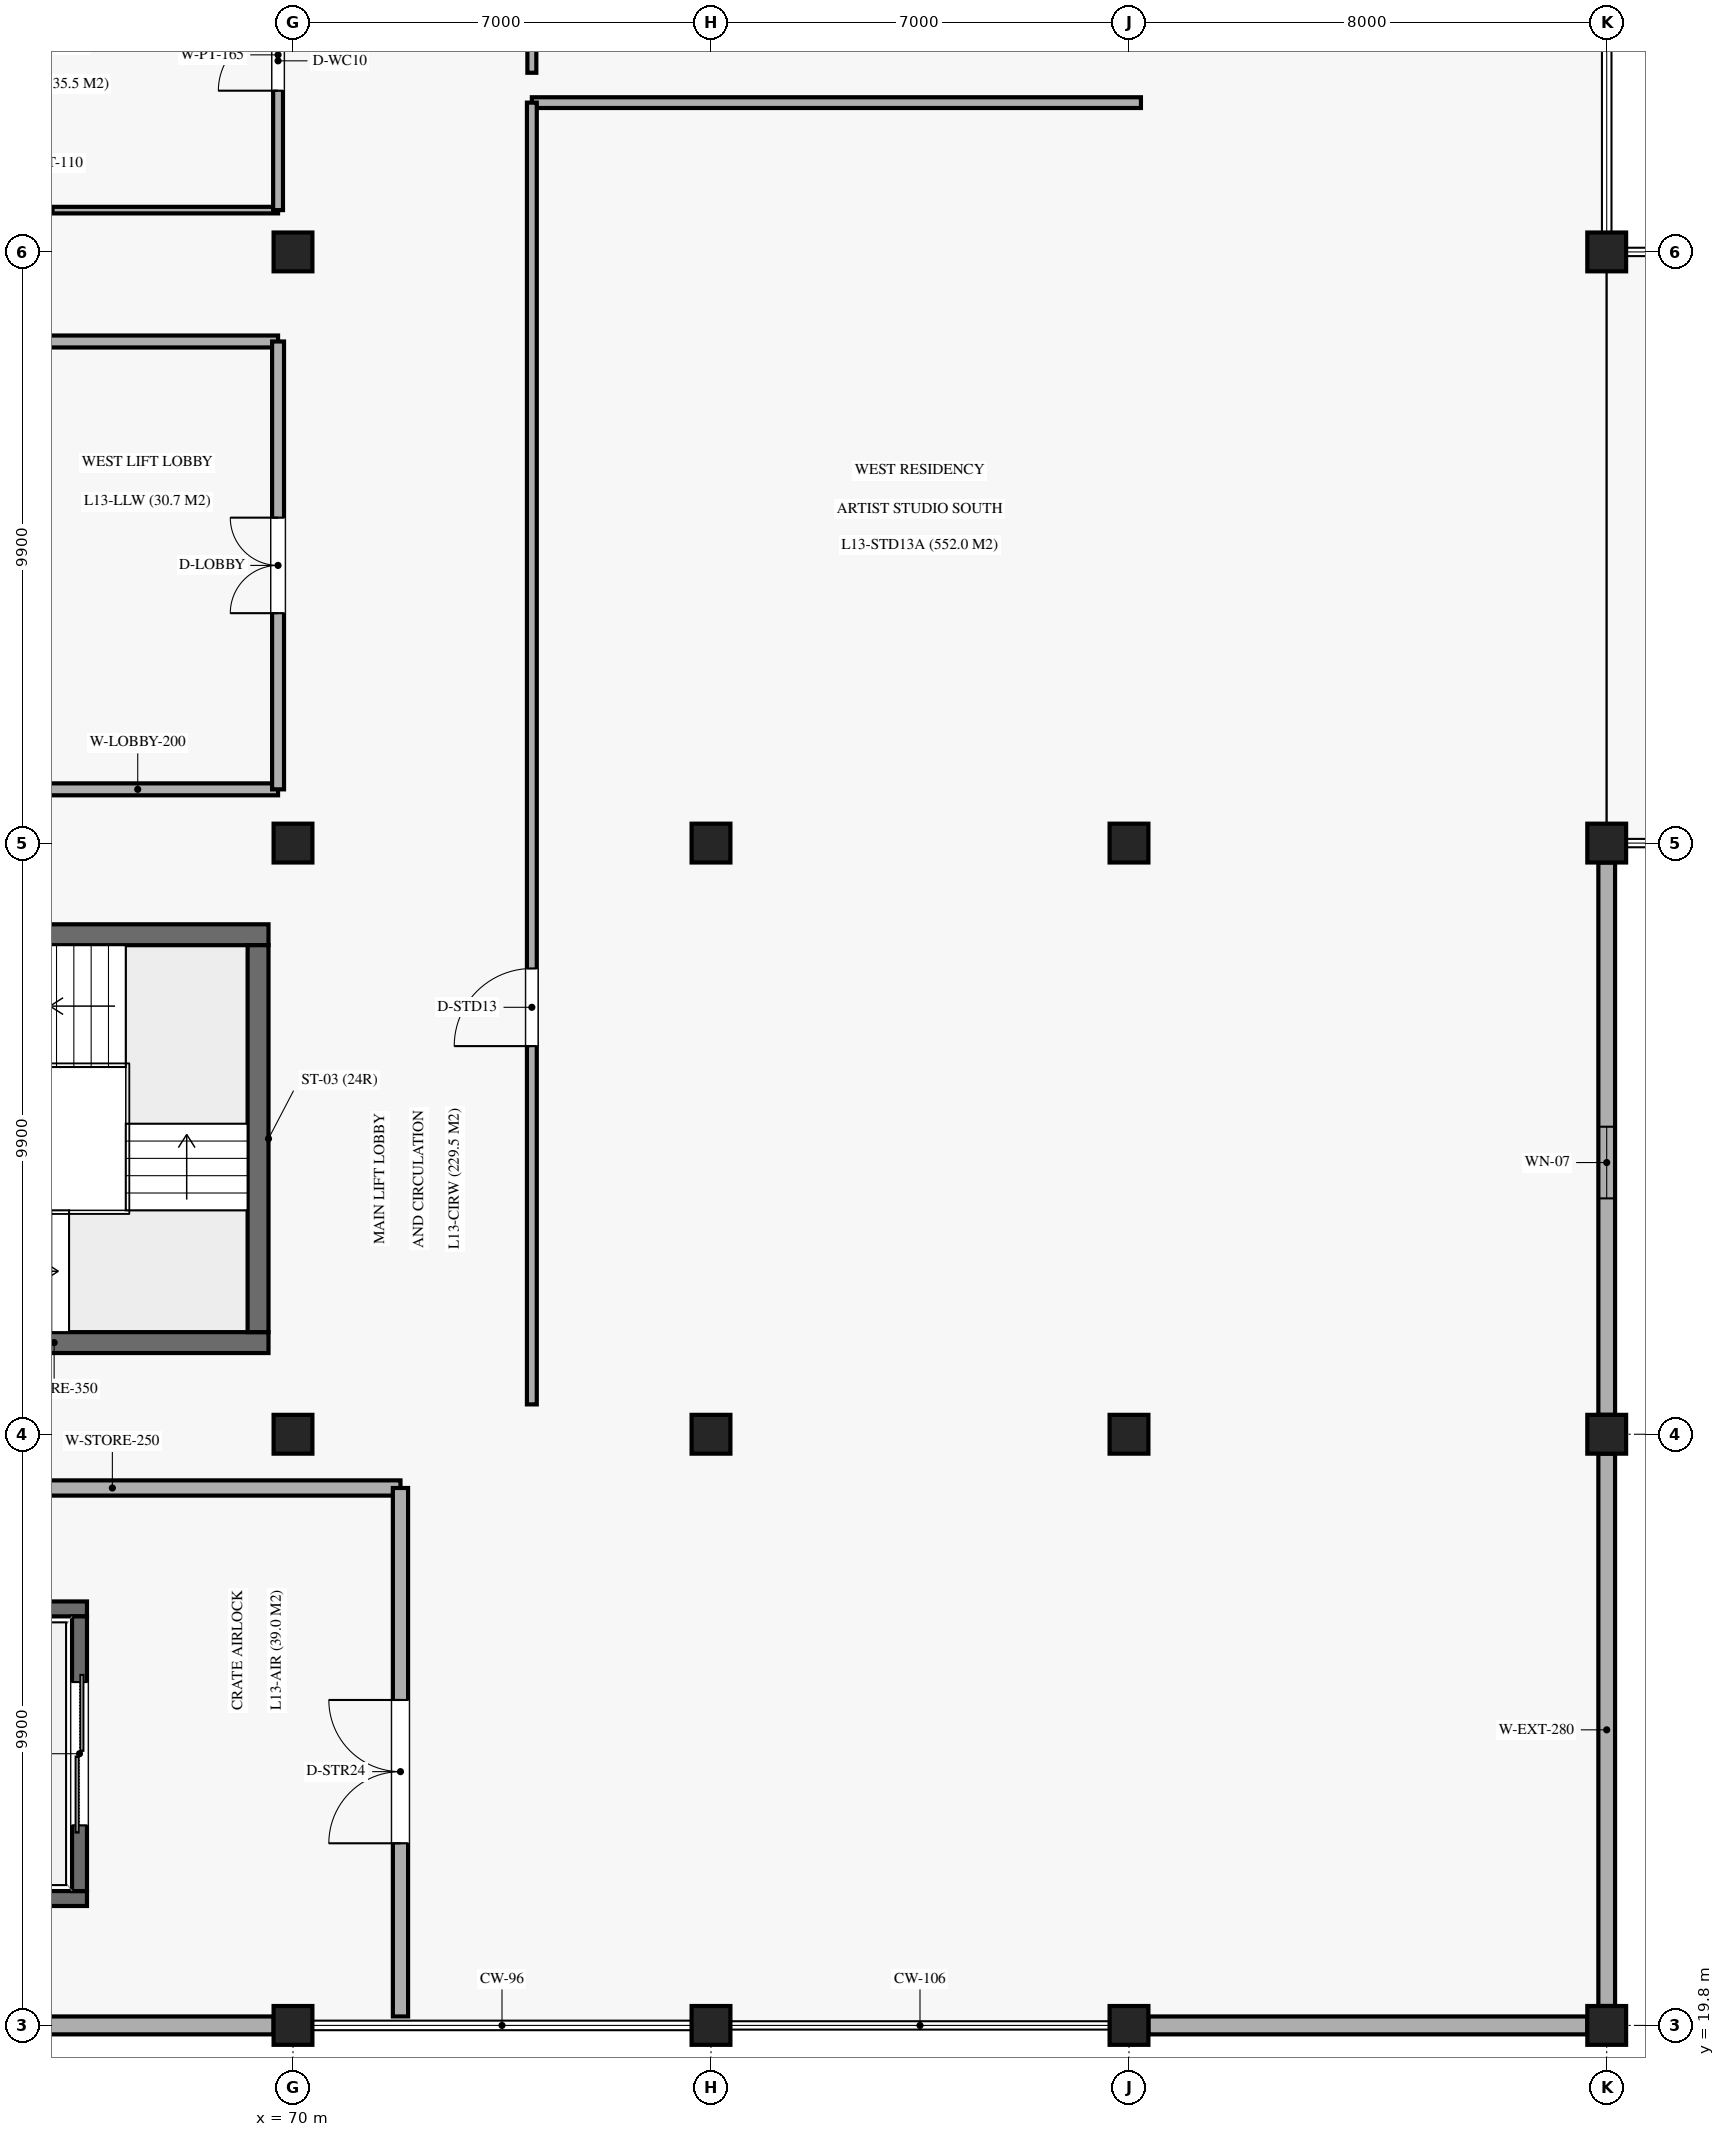
"""IFC4 building model, lengths in metres.
Left out: names, types, materials, properties, quantities, classifications, styles, units other than length and angle.
Written with IfcOpenShell. Run it as: python <this file> out.ifc"""

import sys

from ifc_helpers import new_model, si_unit, direction, frame, frame_2d, origin, origin_2d, place, context, subcontext, project, spatial, rectangle, extrude, element, fill, save


model = new_model("IFC4")
c1 = context("Model", 3, precision=1e-05, world=origin(), true_north=direction((0.0, 1.0)))
c2 = subcontext(c1, "Body", "Model", "MODEL_VIEW")
j1 = project(units=[si_unit("LENGTHUNIT", "METRE"), si_unit("PLANEANGLEUNIT", "RADIAN")], contexts=[c1])
p1 = place(None, origin())
s1 = spatial("IfcSite", under=j1, at=p1, CompositionType="ELEMENT")
p2 = place(p1, origin())
s2 = spatial("IfcBuilding", under=s1, at=p2, CompositionType="ELEMENT")
p3 = place(p2, frame((0.0, 0.0, 66.3)))
s3 = spatial("IfcBuildingStorey", under=s2, at=p3, CompositionType="ELEMENT", Elevation=66.3)
for number, where, z_axis, x_axis in (
    (1, (70.0, 19.8, 0.0), (0.0, 0.0, 1.0), (1.0, 0.0, 0.0)),
    (2, (70.0, 29.7, 0.0), (0.0, 0.0, 1.0), (1.0, 0.0, 0.0)),
    (3, (70.0, 39.6, 0.0), (0.0, 0.0, 1.0), (1.0, 0.0, 0.0)),
    (4, (70.0, 49.5, 0.0), (0.0, 0.0, 1.0), (1.0, 0.0, 0.0)),
    (5, (77.0, 19.8, 0.0), (0.0, 0.0, 1.0), (1.0, 0.0, 0.0)),
    (6, (77.0, 29.7, 0.0), (0.0, 0.0, 1.0), (1.0, 0.0, 0.0)),
    (7, (77.0, 39.6, 0.0), (0.0, 0.0, 1.0), (1.0, 0.0, 0.0)),
    (8, (84.0, 19.8, 0.0), (0.0, 0.0, 1.0), (1.0, 0.0, 0.0)),
    (9, (84.0, 29.7, 0.0), (0.0, 0.0, 1.0), (1.0, 0.0, 0.0)),
    (10, (84.0, 39.6, 0.0), (0.0, 0.0, 1.0), (1.0, 0.0, 0.0)),
    (11, (92.0, 19.8, 0.0), (0.0, 0.0, 1.0), (1.0, 0.0, 0.0)),
    (12, (92.0, 29.7, 0.0), (0.0, 0.0, 1.0), (1.0, 0.0, 0.0)),
    (13, (92.0, 39.6, 0.0), (0.0, 0.0, 1.0), (1.0, 0.0, 0.0)),
    (14, (92.0, 49.5, 0.0), (0.0, 0.0, 1.0), (1.0, 0.0, 0.0)),
):
    element("IfcColumn", number, at=place(p3, frame(where, z_axis=z_axis, x_axis=x_axis)), inside=s3, PredefinedType="COLUMN", context=c2, shape_type="SweptSolid", body=[
        extrude(rectangle(XDim=0.65, YDim=0.65, at=origin_2d()), origin(), (0.0, 0.0, 1.0), 4.08),
    ])
p4 = place(p3, frame((92.0, 20.125, 0.0), z_axis=(0.0, 0.0, 1.0), x_axis=(0.0, 1.0, 0.0)))
e15 = element("IfcWall", 15, at=p4, inside=s3, PredefinedType="SOLIDWALL", context=c2, shape_type="SweptSolid", body=[
    extrude(rectangle(XDim=9.25, YDim=0.28, at=frame_2d((4.625, 0.0))), origin(), (0.0, 0.0, 1.0), 3.08),
])
p5 = place(p3, frame((92.0, 30.025, 0.0), z_axis=(0.0, 0.0, 1.0), x_axis=(0.0, 1.0, 0.0)))
e16 = element("IfcWall", 16, at=p5, inside=s3, PredefinedType="SOLIDWALL", context=c2, shape_type="SweptSolid", body=[
    extrude(rectangle(XDim=9.25, YDim=0.28, at=frame_2d((4.625, 0.0))), origin(), (0.0, 0.0, 1.0), 3.08),
])
p6 = place(p5, frame((3.625, 0.0, 1.15)))
e17 = element("IfcOpeningElement", 17, at=p6, cuts=e16, PredefinedType="OPENING", context=c2, shape_type="SweptSolid", body=[
    extrude(rectangle(XDim=1.2, YDim=1.5, at=frame_2d((0.6, 0.75))), frame((0.0, 0.15, 0.0), z_axis=(0.0, -1.0, 0.0), x_axis=(1.0, 0.0, 0.0)), (0.0, 0.0, 1.0), 0.3),
])
for number, where, z_axis, x_axis in (
    (18, (62.325, 19.8, 0.0), (0.0, 0.0, 1.0), (1.0, 0.0, 0.0)),
    (19, (84.325, 19.8, 0.0), (0.0, 0.0, 1.0), (1.0, 0.0, 0.0)),
):
    element("IfcWall", number, at=place(p3, frame(where, z_axis=z_axis, x_axis=x_axis)), inside=s3, PredefinedType="SOLIDWALL", context=c2, shape_type="SweptSolid", body=[
        extrude(rectangle(XDim=7.35, YDim=0.3, at=frame_2d((3.675, 0.0))), origin(), (0.0, 0.0, 1.0), 3.08),
    ])
p7 = place(p3, frame((62.41, 31.235, 0.0), z_axis=(0.0, 0.0, 1.0), x_axis=(1.0, 0.0, 0.0)))
e20 = element("IfcWall", 20, at=p7, inside=s3, PredefinedType="SHEAR", context=c2, shape_type="SweptSolid", body=[
    extrude(rectangle(XDim=7.18, YDim=0.35, at=frame_2d((3.59, 0.0))), origin(), (0.0, 0.0, 1.0), 3.83),
])
p8 = place(p7, frame((0.77, 0.0, 0.0)))
e21 = element("IfcOpeningElement", 21, at=p8, cuts=e20, PredefinedType="OPENING", context=c2, shape_type="SweptSolid", body=[
    extrude(rectangle(XDim=1.2, YDim=2.2, at=frame_2d((0.6, 1.1))), frame((0.0, 0.185, 0.0), z_axis=(0.0, -1.0, 0.0), x_axis=(1.0, 0.0, 0.0)), (0.0, 0.0, 1.0), 0.37),
])
p9 = place(p3, frame((62.41, 38.065, 0.0), z_axis=(0.0, 0.0, 1.0), x_axis=(1.0, 0.0, 0.0)))
e22 = element("IfcWall", 22, at=p9, inside=s3, PredefinedType="SHEAR", context=c2, shape_type="SweptSolid", body=[
    extrude(rectangle(XDim=7.18, YDim=0.35, at=frame_2d((3.59, 0.0))), origin(), (0.0, 0.0, 1.0), 3.83),
])
p10 = place(p3, frame((69.415, 31.41, 0.0), z_axis=(0.0, 0.0, 1.0), x_axis=(0.0, 1.0, 0.0)))
e23 = element("IfcWall", 23, at=p10, inside=s3, PredefinedType="SHEAR", context=c2, shape_type="SweptSolid", body=[
    extrude(rectangle(XDim=6.48, YDim=0.35, at=frame_2d((3.24, 0.0))), origin(), (0.0, 0.0, 1.0), 3.83),
])
for number, where, z_axis, x_axis in (
    (24, (62.65, 21.925, 0.0), (0.0, 0.0, 1.0), (1.0, 0.0, 0.0)),
    (25, (62.65, 26.775, 0.0), (0.0, 0.0, 1.0), (1.0, 0.0, 0.0)),
):
    element("IfcWall", number, at=place(p3, frame(where, z_axis=z_axis, x_axis=x_axis)), inside=s3, PredefinedType="SOLIDWALL", context=c2, shape_type="SweptSolid", body=[
        extrude(rectangle(XDim=3.9, YDim=0.25, at=frame_2d((1.95, 0.0))), origin(), (0.0, 0.0, 1.0), 3.81),
    ])
p11 = place(p3, frame((66.425, 22.05, 0.0), z_axis=(0.0, 0.0, 1.0), x_axis=(0.0, 1.0, 0.0)))
e26 = element("IfcWall", 26, at=p11, inside=s3, PredefinedType="SOLIDWALL", context=c2, shape_type="SweptSolid", body=[
    extrude(rectangle(XDim=4.6, YDim=0.25, at=frame_2d((2.3, 0.0))), origin(), (0.0, 0.0, 1.0), 3.81),
])
p12 = place(p11, frame((1.1, 0.0, 0.0)))
e27 = element("IfcOpeningElement", 27, at=p12, cuts=e26, PredefinedType="OPENING", context=c2, shape_type="SweptSolid", body=[
    extrude(rectangle(XDim=2.4, YDim=2.65, at=frame_2d((1.2, 1.325))), frame((0.0, 0.135, 0.0), z_axis=(0.0, -1.0, 0.0), x_axis=(1.0, 0.0, 0.0)), (0.0, 0.0, 1.0), 0.27),
])
for number, where, z_axis, x_axis in (
    (28, (65.05, 40.5, 0.0), (0.0, 0.0, 1.0), (1.0, 0.0, 0.0)),
    (29, (65.05, 48.0, 0.0), (0.0, 0.0, 1.0), (1.0, 0.0, 0.0)),
):
    element("IfcWall", number, at=place(p3, frame(where, z_axis=z_axis, x_axis=x_axis)), inside=s3, PredefinedType="SOLIDWALL", context=c2, shape_type="SweptSolid", body=[
        extrude(rectangle(XDim=4.7, YDim=0.2, at=frame_2d((2.35, 0.0))), origin(), (0.0, 0.0, 1.0), 2.95),
    ])
p13 = place(p3, frame((69.75, 40.5, 0.0), z_axis=(0.0, 0.0, 1.0), x_axis=(0.0, 1.0, 0.0)))
e30 = element("IfcWall", 30, at=p13, inside=s3, PredefinedType="SOLIDWALL", context=c2, shape_type="SweptSolid", body=[
    extrude(rectangle(XDim=7.5, YDim=0.2, at=frame_2d((3.75, 0.0))), origin(), (0.0, 0.0, 1.0), 2.95),
])
p14 = place(p13, frame((2.95, 0.0, 0.0)))
e31 = element("IfcOpeningElement", 31, at=p14, cuts=e30, PredefinedType="OPENING", context=c2, shape_type="SweptSolid", body=[
    extrude(rectangle(XDim=1.6, YDim=2.2, at=frame_2d((0.8, 1.1))), frame((0.0, 0.11, 0.0), z_axis=(0.0, -1.0, 0.0), x_axis=(1.0, 0.0, 0.0)), (0.0, 0.0, 1.0), 0.22),
])
p15 = place(p3, frame((62.15, 28.8, 0.0), z_axis=(0.0, 0.0, 1.0), x_axis=(1.0, 0.0, 0.0)))
e32 = element("IfcWall", 32, at=p15, inside=s3, PredefinedType="SOLIDWALL", context=c2, shape_type="SweptSolid", body=[
    extrude(rectangle(XDim=9.65, YDim=0.255, at=frame_2d((4.825, 0.0))), origin(), (0.0, 0.0, 1.0), 2.95),
])
p16 = place(p3, frame((71.8, 19.95, 0.0), z_axis=(0.0, 0.0, 1.0), x_axis=(0.0, 1.0, 0.0)))
e33 = element("IfcWall", 33, at=p16, inside=s3, PredefinedType="SOLIDWALL", context=c2, shape_type="SweptSolid", body=[
    extrude(rectangle(XDim=8.85, YDim=0.255, at=frame_2d((4.425, 0.0))), origin(), (0.0, 0.0, 1.0), 2.95),
])
p17 = place(p16, frame((2.9, 0.0, 0.0)))
e34 = element("IfcOpeningElement", 34, at=p17, cuts=e33, PredefinedType="OPENING", context=c2, shape_type="SweptSolid", body=[
    extrude(rectangle(XDim=2.4, YDim=2.5, at=frame_2d((1.2, 1.25))), frame((0.0, 0.137, 0.0), z_axis=(0.0, -1.0, 0.0), x_axis=(1.0, 0.0, 0.0)), (0.0, 0.0, 1.0), 0.275),
])
p18 = place(p3, frame((62.15, 50.2, 0.0), z_axis=(0.0, 0.0, 1.0), x_axis=(1.0, 0.0, 0.0)))
e35 = element("IfcWall", 35, at=p18, inside=s3, PredefinedType="PARTITIONING", context=c2, shape_type="SweptSolid", body=[
    extrude(rectangle(XDim=7.6, YDim=0.11, at=frame_2d((3.8, 0.0))), origin(), (0.0, 0.0, 1.0), 2.95),
])
p19 = place(p3, frame((69.75, 50.2, 0.0), z_axis=(0.0, 0.0, 1.0), x_axis=(0.0, 1.0, 0.0)))
e36 = element("IfcWall", 36, at=p19, inside=s3, PredefinedType="PARTITIONING", context=c2, shape_type="SweptSolid", body=[
    extrude(rectangle(XDim=5.2, YDim=0.165, at=frame_2d((2.6, 0.0))), origin(), (0.0, 0.0, 1.0), 2.95),
])
p20 = place(p19, frame((2.0, 0.0, 0.0)))
e37 = element("IfcOpeningElement", 37, at=p20, cuts=e36, PredefinedType="OPENING", context=c2, shape_type="SweptSolid", body=[
    extrude(rectangle(XDim=1.0, YDim=2.1, at=frame_2d((0.5, 1.05))), frame((0.0, 0.093, 0.0), z_axis=(0.0, -1.0, 0.0), x_axis=(1.0, 0.0, 0.0)), (0.0, 0.0, 1.0), 0.185),
])
p21 = place(p3, frame((74.0, 52.0, 0.0), z_axis=(0.0, 0.0, 1.0), x_axis=(1.0, 0.0, 0.0)))
e38 = element("IfcWall", 38, at=p21, inside=s3, PredefinedType="PARTITIONING", context=c2, shape_type="SweptSolid", body=[
    extrude(rectangle(XDim=10.2, YDim=0.18, at=frame_2d((5.1, 0.0))), origin(), (0.0, 0.0, 1.0), 2.95),
])
p22 = place(p3, frame((74.0, 30.2, 0.0), z_axis=(0.0, 0.0, 1.0), x_axis=(0.0, 1.0, 0.0)))
e39 = element("IfcWall", 39, at=p22, inside=s3, PredefinedType="PARTITIONING", context=c2, shape_type="SweptSolid", body=[
    extrude(rectangle(XDim=21.8, YDim=0.165, at=frame_2d((10.9, 0.0))), origin(), (0.0, 0.0, 1.0), 2.95),
])
p23 = place(p22, frame((6.0, 0.0, 0.0)))
e40 = element("IfcOpeningElement", 40, at=p23, cuts=e39, PredefinedType="OPENING", context=c2, shape_type="SweptSolid", body=[
    extrude(rectangle(XDim=1.3, YDim=2.25, at=frame_2d((0.65, 1.125))), frame((0.0, 0.093, 0.0), z_axis=(0.0, -1.0, 0.0), x_axis=(1.0, 0.0, 0.0)), (0.0, 0.0, 1.0), 0.185),
])
p24 = place(p3, frame((74.0, 52.5, 0.0), z_axis=(0.0, 0.0, 1.0), x_axis=(0.0, 1.0, 0.0)))
e41 = element("IfcWall", 41, at=p24, inside=s3, PredefinedType="PARTITIONING", context=c2, shape_type="SweptSolid", body=[
    extrude(rectangle(XDim=16.3, YDim=0.15, at=frame_2d((8.15, 0.0))), origin(), (0.0, 0.0, 1.0), 2.95),
])
p25 = place(p24, frame((6.0, 0.0, 0.0)))
e42 = element("IfcOpeningElement", 42, at=p25, cuts=e41, PredefinedType="OPENING", context=c2, shape_type="SweptSolid", body=[
    extrude(rectangle(XDim=1.3, YDim=2.15, at=frame_2d((0.65, 1.075))), frame((0.0, 0.085, 0.0), z_axis=(0.0, -1.0, 0.0), x_axis=(1.0, 0.0, 0.0)), (0.0, 0.0, 1.0), 0.17),
])
p26 = place(p6, origin())
e43 = element("IfcWindow", 43, at=p26, inside=s3, PartitioningType="SINGLE_PANEL", PredefinedType="WINDOW", context=c2, shape_type="SweptSolid", body=[
    extrude(rectangle(XDim=1.2, YDim=1.5, at=frame_2d((0.6, 0.75))), frame((0.0, 0.03, 0.0), z_axis=(0.0, -1.0, 0.0), x_axis=(1.0, 0.0, 0.0)), (0.0, 0.0, 1.0), 0.06),
])
fill(e17, e43)
p27 = place(p12, origin())
e44 = element("IfcDoor", 44, at=p27, inside=s3, OperationType="DOUBLE_DOOR_SLIDING", PredefinedType="DOOR", context=c2, shape_type="SweptSolid", body=[
    extrude(rectangle(XDim=2.4, YDim=2.65, at=frame_2d((1.2, 1.325))), frame((0.0, 0.025, 0.0), z_axis=(0.0, -1.0, 0.0), x_axis=(1.0, 0.0, 0.0)), (0.0, 0.0, 1.0), 0.05),
])
fill(e27, e44)
p28 = place(p14, origin())
e45 = element("IfcDoor", 45, at=p28, inside=s3, OperationType="DOUBLE_DOOR_SINGLE_SWING", PredefinedType="DOOR", context=c2, shape_type="SweptSolid", body=[
    extrude(rectangle(XDim=1.6, YDim=2.2, at=frame_2d((0.8, 1.1))), frame((0.0, 0.025, 0.0), z_axis=(0.0, -1.0, 0.0), x_axis=(1.0, 0.0, 0.0)), (0.0, 0.0, 1.0), 0.05),
])
fill(e31, e45)
p29 = place(p17, origin())
e46 = element("IfcDoor", 46, at=p29, inside=s3, OperationType="DOUBLE_DOOR_SINGLE_SWING", PredefinedType="DOOR", context=c2, shape_type="SweptSolid", body=[
    extrude(rectangle(XDim=2.4, YDim=2.5, at=frame_2d((1.2, 1.25))), frame((0.0, 0.025, 0.0), z_axis=(0.0, -1.0, 0.0), x_axis=(1.0, 0.0, 0.0)), (0.0, 0.0, 1.0), 0.05),
])
fill(e34, e46)
p30 = place(p20, origin())
e47 = element("IfcDoor", 47, at=p30, inside=s3, OperationType="SINGLE_SWING_LEFT", PredefinedType="DOOR", context=c2, shape_type="SweptSolid", body=[
    extrude(rectangle(XDim=1.0, YDim=2.1, at=frame_2d((0.5, 1.05))), frame((0.0, 0.025, 0.0), z_axis=(0.0, -1.0, 0.0), x_axis=(1.0, 0.0, 0.0)), (0.0, 0.0, 1.0), 0.05),
])
fill(e37, e47)
p31 = place(p23, origin())
e48 = element("IfcDoor", 48, at=p31, inside=s3, OperationType="SINGLE_SWING_LEFT", PredefinedType="DOOR", context=c2, shape_type="SweptSolid", body=[
    extrude(rectangle(XDim=1.3, YDim=2.25, at=frame_2d((0.65, 1.125))), frame((0.0, 0.025, 0.0), z_axis=(0.0, -1.0, 0.0), x_axis=(1.0, 0.0, 0.0)), (0.0, 0.0, 1.0), 0.05),
])
fill(e40, e48)
save(model, sys.argv[1])
